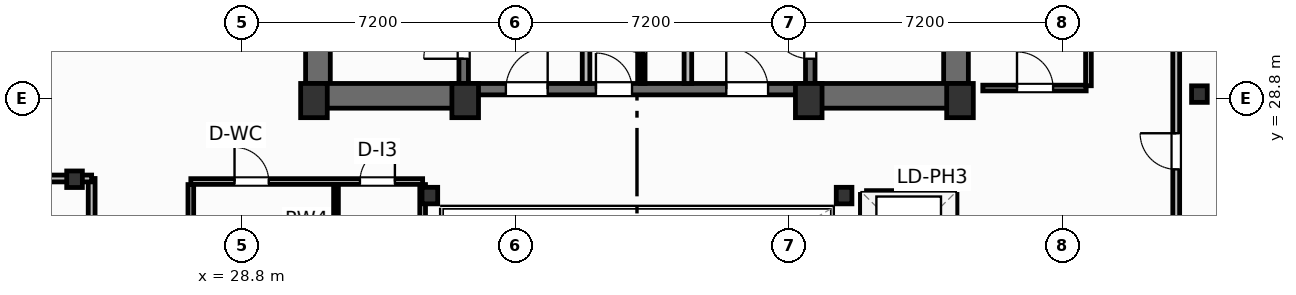
"""IFC4 building model, lengths in metres.
Left out: names, types, materials, properties, quantities, classifications, styles, units other than length and angle.
Written with IfcOpenShell. Run it as: python <this file> out.ifc"""

import sys

from ifc_helpers import new_model, si_unit, direction, frame, frame_2d, origin, origin_2d, place, context, subcontext, project, spatial, rectangle, i_section, extrude, element, fill, save


model = new_model("IFC4")
c1 = context("Model", 3, precision=1e-05, world=origin(), true_north=direction((0.0, 1.0)))
c2 = subcontext(c1, "Body", "Model", "MODEL_VIEW")
j1 = project(units=[si_unit("LENGTHUNIT", "METRE"), si_unit("PLANEANGLEUNIT", "RADIAN")], contexts=[c1])
p1 = place(None, origin())
s1 = spatial("IfcSite", under=j1, at=p1, CompositionType="ELEMENT")
p2 = place(p1, origin())
s2 = spatial("IfcBuilding", under=s1, at=p2, CompositionType="ELEMENT")
p3 = place(p2, frame((0.0, 0.0, 216.4)))
s3 = spatial("IfcBuildingStorey", under=s2, at=p3, CompositionType="ELEMENT", Elevation=216.4)
for number, where, z_axis, x_axis in (
    (1, (30.7, 28.75, 0.0), (0.0, 0.0, 1.0), (1.0, 0.0, 0.0)),
    (2, (34.68, 28.75, 0.0), (0.0, 0.0, 1.0), (1.0, 0.0, 0.0)),
    (3, (43.72, 28.75, 0.0), (0.0, 0.0, 1.0), (1.0, 0.0, 0.0)),
    (4, (47.7, 28.75, 0.0), (0.0, 0.0, 1.0), (1.0, 0.0, 0.0)),
):
    element("IfcColumn", number, at=place(p3, frame(where, z_axis=z_axis, x_axis=x_axis)), inside=s3, PredefinedType="COLUMN", context=c2, shape_type="SweptSolid", body=[
        extrude(rectangle(XDim=0.7, YDim=0.9, at=origin_2d()), origin(), (0.0, 0.0, 1.0), 3.7),
    ])
for number, where, z_axis, x_axis in (
    (5, (33.75, 26.25, 0.0), (0.0, 0.0, 1.0), (1.0, 0.0, 0.0)),
    (6, (44.65, 26.25, 0.0), (0.0, 0.0, 1.0), (1.0, 0.0, 0.0)),
    (7, (24.4, 26.68, 0.0), (0.0, 0.0, 1.0), (1.0, 0.0, 0.0)),
    (8, (54.0, 28.92, 0.0), (0.0, 0.0, 1.0), (1.0, 0.0, 0.0)),
):
    element("IfcColumn", number, at=place(p3, frame(where, z_axis=z_axis, x_axis=x_axis)), inside=s3, PredefinedType="COLUMN", context=c2, shape_type="SweptSolid", body=[
        extrude(i_section(OverallWidth=0.412, OverallDepth=0.435, WebThickness=0.036, FlangeThickness=0.057, FilletRadius=0.025, at=origin_2d()), origin(), (0.0, 0.0, 1.0), 3.7),
    ])
for number, where, z_axis, x_axis in (
    (9, (30.805, 29.2, 0.0), (0.0, 0.0, 1.0), (0.0, 1.0, 0.0)),
    (10, (47.595, 29.2, 0.0), (0.0, 0.0, 1.0), (0.0, 1.0, 0.0)),
):
    element("IfcWall", number, at=place(p3, frame(where, z_axis=z_axis, x_axis=x_axis)), inside=s3, PredefinedType="SHEAR", context=c2, shape_type="SweptSolid", body=[
        extrude(rectangle(XDim=9.22, YDim=0.65, at=frame_2d((4.61, 0.0))), origin(), (0.0, 0.0, 1.0), 3.45),
    ])
p4 = place(p3, frame((30.48, 28.875, 0.0), z_axis=(0.0, 0.0, 1.0), x_axis=(1.0, 0.0, 0.0)))
e11 = element("IfcWall", 11, at=p4, inside=s3, PredefinedType="SHEAR", context=c2, shape_type="SweptSolid", body=[
    extrude(rectangle(XDim=4.32, YDim=0.65, at=frame_2d((2.16, 0.0))), origin(), (0.0, 0.0, 1.0), 3.45),
])
p5 = place(p3, frame((43.6, 28.875, 0.0), z_axis=(0.0, 0.0, 1.0), x_axis=(1.0, 0.0, 0.0)))
e12 = element("IfcWall", 12, at=p5, inside=s3, PredefinedType="SHEAR", context=c2, shape_type="SweptSolid", body=[
    extrude(rectangle(XDim=4.32, YDim=0.65, at=frame_2d((2.16, 0.0))), origin(), (0.0, 0.0, 1.0), 3.45),
])
p6 = place(p3, frame((34.8, 29.05, 0.0), z_axis=(0.0, 0.0, 1.0), x_axis=(1.0, 0.0, 0.0)))
e13 = element("IfcWall", 13, at=p6, inside=s3, PredefinedType="SHEAR", context=c2, shape_type="SweptSolid", body=[
    extrude(rectangle(XDim=8.8, YDim=0.3, at=frame_2d((4.4, 0.0))), origin(), (0.0, 0.0, 1.0), 3.45),
])
p7 = place(p6, frame((0.95, 0.0, 0.0)))
e14 = element("IfcOpeningElement", 14, at=p7, cuts=e13, PredefinedType="OPENING", context=c2, shape_type="SweptSolid", body=[
    extrude(rectangle(XDim=1.1, YDim=2.15, at=frame_2d((0.55, 1.075))), frame((0.0, 0.16, 0.0), z_axis=(0.0, -1.0, 0.0), x_axis=(1.0, 0.0, 0.0)), (0.0, 0.0, 1.0), 0.32),
])
p8 = place(p6, frame((6.75, 0.0, 0.0)))
e15 = element("IfcOpeningElement", 15, at=p8, cuts=e13, PredefinedType="OPENING", context=c2, shape_type="SweptSolid", body=[
    extrude(rectangle(XDim=1.1, YDim=2.15, at=frame_2d((0.55, 1.075))), frame((0.0, 0.16, 0.0), z_axis=(0.0, -1.0, 0.0), x_axis=(1.0, 0.0, 0.0)), (0.0, 0.0, 1.0), 0.32),
])
p9 = place(p6, frame((3.32, 0.0, 0.0)))
e16 = element("IfcOpeningElement", 16, at=p9, cuts=e13, PredefinedType="OPENING", context=c2, shape_type="SweptSolid", body=[
    extrude(rectangle(XDim=0.95, YDim=2.15, at=frame_2d((0.475, 1.075))), frame((0.0, 0.16, 0.0), z_axis=(0.0, -1.0, 0.0), x_axis=(1.0, 0.0, 0.0)), (0.0, 0.0, 1.0), 0.32),
])
p10 = place(p3, frame((34.64, 29.2, 0.0), z_axis=(0.0, 0.0, 1.0), x_axis=(0.0, 1.0, 0.0)))
e17 = element("IfcWall", 17, at=p10, inside=s3, PredefinedType="SHEAR", context=c2, shape_type="SweptSolid", body=[
    extrude(rectangle(XDim=9.22, YDim=0.25, at=frame_2d((4.61, 0.0))), origin(), (0.0, 0.0, 1.0), 3.45),
])
p11 = place(p10, frame((0.65, 0.0, 0.0)))
e18 = element("IfcOpeningElement", 18, at=p11, cuts=e17, PredefinedType="OPENING", context=c2, shape_type="SweptSolid", body=[
    extrude(rectangle(XDim=1.05, YDim=2.15, at=frame_2d((0.525, 1.075))), frame((0.0, 0.135, 0.0), z_axis=(0.0, -1.0, 0.0), x_axis=(1.0, 0.0, 0.0)), (0.0, 0.0, 1.0), 0.27),
])
p12 = place(p3, frame((43.76, 29.2, 0.0), z_axis=(0.0, 0.0, 1.0), x_axis=(0.0, 1.0, 0.0)))
e19 = element("IfcWall", 19, at=p12, inside=s3, PredefinedType="SHEAR", context=c2, shape_type="SweptSolid", body=[
    extrude(rectangle(XDim=9.22, YDim=0.25, at=frame_2d((4.61, 0.0))), origin(), (0.0, 0.0, 1.0), 3.45),
])
p13 = place(p12, frame((0.65, 0.0, 0.0)))
e20 = element("IfcOpeningElement", 20, at=p13, cuts=e19, PredefinedType="OPENING", context=c2, shape_type="SweptSolid", body=[
    extrude(rectangle(XDim=1.05, YDim=2.15, at=frame_2d((0.525, 1.075))), frame((0.0, 0.135, 0.0), z_axis=(0.0, -1.0, 0.0), x_axis=(1.0, 0.0, 0.0)), (0.0, 0.0, 1.0), 0.27),
])
p14 = place(p3, frame((24.85, 19.2, 0.0), z_axis=(0.0, 0.0, 1.0), x_axis=(0.0, 1.0, 0.0)))
e21 = element("IfcWall", 21, at=p14, inside=s3, PredefinedType="PARTITIONING", context=c2, shape_type="SweptSolid", body=[
    extrude(rectangle(XDim=7.5, YDim=0.18, at=frame_2d((3.75, 0.0))), origin(), (0.0, 0.0, 1.0), 3.45),
])
p15 = place(p14, frame((3.275, 0.0, 0.0)))
e22 = element("IfcOpeningElement", 22, at=p15, cuts=e21, PredefinedType="OPENING", context=c2, shape_type="SweptSolid", body=[
    extrude(rectangle(XDim=0.95, YDim=2.05, at=frame_2d((0.475, 1.025))), frame((0.0, 0.1, 0.0), z_axis=(0.0, -1.0, 0.0), x_axis=(1.0, 0.0, 0.0)), (0.0, 0.0, 1.0), 0.2),
])
p16 = place(p3, frame((3.467, 26.7, 0.0), z_axis=(0.0, 0.0, 1.0), x_axis=(1.0, 0.0, 0.0)))
e23 = element("IfcWall", 23, at=p16, inside=s3, PredefinedType="PARTITIONING", context=c2, shape_type="SweptSolid", body=[
    extrude(rectangle(XDim=21.383, YDim=0.18, at=frame_2d((10.691, 0.0))), origin(), (0.0, 0.0, 1.0), 2.662),
])
p17 = place(p3, frame((53.39, 19.24, 0.0), z_axis=(0.0, 0.0, 1.0), x_axis=(0.0, 1.0, 0.0)))
e24 = element("IfcWall", 24, at=p17, inside=s3, PredefinedType="PARTITIONING", context=c2, shape_type="SweptSolid", body=[
    extrude(rectangle(XDim=20.06, YDim=0.18, at=frame_2d((10.03, 0.0))), origin(), (0.0, 0.0, 1.0), 3.45),
])
p18 = place(p17, frame((7.7, 0.0, 0.0)))
e25 = element("IfcOpeningElement", 25, at=p18, cuts=e24, PredefinedType="OPENING", context=c2, shape_type="SweptSolid", body=[
    extrude(rectangle(XDim=0.95, YDim=2.05, at=frame_2d((0.475, 1.025))), frame((0.0, 0.1, 0.0), z_axis=(0.0, -1.0, 0.0), x_axis=(1.0, 0.0, 0.0)), (0.0, 0.0, 1.0), 0.2),
])
for number, where, z_axis, x_axis in (
    (26, (37.86, 29.2, 0.0), (0.0, 0.0, 1.0), (0.0, 1.0, 0.0)),
    (27, (40.54, 29.2, 0.0), (0.0, 0.0, 1.0), (0.0, 1.0, 0.0)),
):
    element("IfcWall", number, at=place(p3, frame(where, z_axis=z_axis, x_axis=x_axis)), inside=s3, PredefinedType="PARTITIONING", context=c2, shape_type="SweptSolid", body=[
        extrude(rectangle(XDim=5.18, YDim=0.2, at=frame_2d((2.59, 0.0))), origin(), (0.0, 0.0, 1.0), 3.45),
    ])
p19 = place(p3, frame((39.35, 29.2, 0.0), z_axis=(0.0, 0.0, 1.0), x_axis=(0.0, 1.0, 0.0)))
e28 = element("IfcWall", 28, at=p19, inside=s3, PredefinedType="PARTITIONING", context=c2, shape_type="SweptSolid", body=[
    extrude(rectangle(XDim=5.22, YDim=0.125, at=frame_2d((2.61, 0.0))), origin(), (0.0, 0.0, 1.0), 3.45),
])
p20 = place(p19, frame((0.8, 0.0, 0.0)))
e29 = element("IfcOpeningElement", 29, at=p20, cuts=e28, PredefinedType="OPENING", context=c2, shape_type="SweptSolid", body=[
    extrude(rectangle(XDim=0.85, YDim=2.05, at=frame_2d((0.425, 1.025))), frame((0.0, 0.073, 0.0), z_axis=(0.0, -1.0, 0.0), x_axis=(1.0, 0.0, 0.0)), (0.0, 0.0, 1.0), 0.145),
])
p21 = place(p19, frame((3.4, 0.0, 0.0)))
e30 = element("IfcOpeningElement", 30, at=p21, cuts=e28, PredefinedType="OPENING", context=c2, shape_type="SweptSolid", body=[
    extrude(rectangle(XDim=0.85, YDim=2.05, at=frame_2d((0.425, 1.025))), frame((0.0, 0.073, 0.0), z_axis=(0.0, -1.0, 0.0), x_axis=(1.0, 0.0, 0.0)), (0.0, 0.0, 1.0), 0.145),
])
p22 = place(p3, frame((27.46, 26.62, 0.0), z_axis=(0.0, 0.0, 1.0), x_axis=(1.0, 0.0, 0.0)))
e31 = element("IfcWall", 31, at=p22, inside=s3, PredefinedType="PARTITIONING", context=c2, shape_type="SweptSolid", body=[
    extrude(rectangle(XDim=6.1, YDim=0.15, at=frame_2d((3.05, 0.0))), origin(), (0.0, 0.0, 1.0), 2.662),
])
p23 = place(p22, frame((1.15, 0.0, 0.0)))
e32 = element("IfcOpeningElement", 32, at=p23, cuts=e31, PredefinedType="OPENING", context=c2, shape_type="SweptSolid", body=[
    extrude(rectangle(XDim=0.9, YDim=2.05, at=frame_2d((0.45, 1.025))), frame((0.0, 0.085, 0.0), z_axis=(0.0, -1.0, 0.0), x_axis=(1.0, 0.0, 0.0)), (0.0, 0.0, 1.0), 0.17),
])
p24 = place(p22, frame((4.45, 0.0, 0.0)))
e33 = element("IfcOpeningElement", 33, at=p24, cuts=e31, PredefinedType="OPENING", context=c2, shape_type="SweptSolid", body=[
    extrude(rectangle(XDim=0.92, YDim=2.05, at=frame_2d((0.46, 1.025))), frame((0.0, 0.085, 0.0), z_axis=(0.0, -1.0, 0.0), x_axis=(1.0, 0.0, 0.0)), (0.0, 0.0, 1.0), 0.17),
])
p25 = place(p3, frame((31.28, 19.38, 0.0), z_axis=(0.0, 0.0, 1.0), x_axis=(0.0, 1.0, 0.0)))
e34 = element("IfcWall", 34, at=p25, inside=s3, PredefinedType="PARTITIONING", context=c2, shape_type="SweptSolid", body=[
    extrude(rectangle(XDim=7.16, YDim=0.125, at=frame_2d((3.58, 0.0))), origin(), (0.0, 0.0, 1.0), 3.45),
])
p26 = place(p3, frame((27.46, 19.38, 0.0), z_axis=(0.0, 0.0, 1.0), x_axis=(0.0, 1.0, 0.0)))
e35 = element("IfcWall", 35, at=p26, inside=s3, PredefinedType="PARTITIONING", context=c2, shape_type="SweptSolid", body=[
    extrude(rectangle(XDim=7.16, YDim=0.15, at=frame_2d((3.58, 0.0))), origin(), (0.0, 0.0, 1.0), 3.45),
])
p27 = place(p26, frame((1.4, 0.0, 0.0)))
e36 = element("IfcOpeningElement", 36, at=p27, cuts=e35, PredefinedType="OPENING", context=c2, shape_type="SweptSolid", body=[
    extrude(rectangle(XDim=0.95, YDim=2.05, at=frame_2d((0.475, 1.025))), frame((0.0, 0.085, 0.0), z_axis=(0.0, -1.0, 0.0), x_axis=(1.0, 0.0, 0.0)), (0.0, 0.0, 1.0), 0.17),
])
p28 = place(p3, frame((33.56, 19.38, 0.0), z_axis=(0.0, 0.0, 1.0), x_axis=(0.0, 1.0, 0.0)))
e37 = element("IfcWall", 37, at=p28, inside=s3, PredefinedType="PARTITIONING", context=c2, shape_type="SweptSolid", body=[
    extrude(rectangle(XDim=7.16, YDim=0.15, at=frame_2d((3.58, 0.0))), origin(), (0.0, 0.0, 1.0), 2.824),
])
p29 = place(p3, frame((48.3, 29.08, 0.0), z_axis=(0.0, 0.0, 1.0), x_axis=(1.0, 0.0, 0.0)))
e38 = element("IfcWall", 38, at=p29, inside=s3, PredefinedType="PARTITIONING", context=c2, shape_type="SweptSolid", body=[
    extrude(rectangle(XDim=2.72, YDim=0.15, at=frame_2d((1.36, 0.0))), origin(), (0.0, 0.0, 1.0), 2.662),
])
p30 = place(p29, frame((0.9, 0.0, 0.0)))
e39 = element("IfcOpeningElement", 39, at=p30, cuts=e38, PredefinedType="OPENING", context=c2, shape_type="SweptSolid", body=[
    extrude(rectangle(XDim=0.95, YDim=2.05, at=frame_2d((0.475, 1.025))), frame((0.0, 0.085, 0.0), z_axis=(0.0, -1.0, 0.0), x_axis=(1.0, 0.0, 0.0)), (0.0, 0.0, 1.0), 0.17),
])
p31 = place(p3, frame((51.08, 29.14, 0.0), z_axis=(0.0, 0.0, 1.0), x_axis=(0.0, 1.0, 0.0)))
e40 = element("IfcWall", 40, at=p31, inside=s3, PredefinedType="PARTITIONING", context=c2, shape_type="SweptSolid", body=[
    extrude(rectangle(XDim=4.69, YDim=0.15, at=frame_2d((2.345, 0.0))), origin(), (0.0, 0.0, 1.0), 3.45),
])
p32 = place(p3, frame((45.24, 26.28, 0.0), z_axis=(0.0, 0.0, 1.0), x_axis=(1.0, 0.0, 0.0)))
e41 = element("IfcWall", 41, at=p32, inside=s3, PredefinedType="PARTITIONING", context=c2, shape_type="SweptSolid", body=[
    extrude(rectangle(XDim=2.22, YDim=0.2, at=frame_2d((1.11, 0.0))), origin(), (0.0, 0.0, 1.0), 3.45),
])
p33 = place(p3, frame((45.18, 19.38, 0.0), z_axis=(0.0, 0.0, 1.0), x_axis=(0.0, 1.0, 0.0)))
e42 = element("IfcWall", 42, at=p33, inside=s3, PredefinedType="PARTITIONING", context=c2, shape_type="SweptSolid", body=[
    extrude(rectangle(XDim=6.9, YDim=0.2, at=frame_2d((3.45, 0.0))), origin(), (0.0, 0.0, 1.0), 3.45),
])
p34 = place(p3, frame((47.52, 19.38, 0.0), z_axis=(0.0, 0.0, 1.0), x_axis=(0.0, 1.0, 0.0)))
e43 = element("IfcWall", 43, at=p34, inside=s3, PredefinedType="PARTITIONING", context=c2, shape_type="SweptSolid", body=[
    extrude(rectangle(XDim=6.9, YDim=0.2, at=frame_2d((3.45, 0.0))), origin(), (0.0, 0.0, 1.0), 3.45),
])
p35 = place(p34, frame((0.59, 0.0, 0.0)))
e44 = element("IfcOpeningElement", 44, at=p35, cuts=e43, PredefinedType="OPENING", context=c2, shape_type="SweptSolid", body=[
    extrude(rectangle(XDim=1.1, YDim=2.15, at=frame_2d((0.55, 1.075))), frame((0.0, 0.11, 0.0), z_axis=(0.0, -1.0, 0.0), x_axis=(1.0, 0.0, 0.0)), (0.0, 0.0, 1.0), 0.22),
])
p36 = place(p34, frame((2.89, 0.0, 0.0)))
e45 = element("IfcOpeningElement", 45, at=p36, cuts=e43, PredefinedType="OPENING", context=c2, shape_type="SweptSolid", body=[
    extrude(rectangle(XDim=1.1, YDim=2.15, at=frame_2d((0.55, 1.075))), frame((0.0, 0.11, 0.0), z_axis=(0.0, -1.0, 0.0), x_axis=(1.0, 0.0, 0.0)), (0.0, 0.0, 1.0), 0.22),
])
p37 = place(p34, frame((5.19, 0.0, 0.0)))
e46 = element("IfcOpeningElement", 46, at=p37, cuts=e43, PredefinedType="OPENING", context=c2, shape_type="SweptSolid", body=[
    extrude(rectangle(XDim=1.1, YDim=2.15, at=frame_2d((0.55, 1.075))), frame((0.0, 0.11, 0.0), z_axis=(0.0, -1.0, 0.0), x_axis=(1.0, 0.0, 0.0)), (0.0, 0.0, 1.0), 0.22),
])
p38 = place(p18, origin())
e47 = element("IfcDoor", 47, at=p38, inside=s3, OperationType="SINGLE_SWING_RIGHT", PredefinedType="DOOR", context=c2, shape_type="SweptSolid", body=[
    extrude(rectangle(XDim=0.95, YDim=2.05, at=frame_2d((0.475, 1.025))), frame((0.0, 0.025, 0.0), z_axis=(0.0, -1.0, 0.0), x_axis=(1.0, 0.0, 0.0)), (0.0, 0.0, 1.0), 0.05),
])
fill(e25, e47)
p39 = place(p11, origin())
e48 = element("IfcDoor", 48, at=p39, inside=s3, OperationType="SINGLE_SWING_LEFT", PredefinedType="DOOR", context=c2, shape_type="SweptSolid", body=[
    extrude(rectangle(XDim=1.05, YDim=2.15, at=frame_2d((0.525, 1.075))), frame((0.0, 0.025, 0.0), z_axis=(0.0, -1.0, 0.0), x_axis=(1.0, 0.0, 0.0)), (0.0, 0.0, 1.0), 0.05),
])
fill(e18, e48)
p40 = place(p13, origin())
e49 = element("IfcDoor", 49, at=p40, inside=s3, OperationType="SINGLE_SWING_RIGHT", PredefinedType="DOOR", context=c2, shape_type="SweptSolid", body=[
    extrude(rectangle(XDim=1.05, YDim=2.15, at=frame_2d((0.525, 1.075))), frame((0.0, 0.025, 0.0), z_axis=(0.0, -1.0, 0.0), x_axis=(1.0, 0.0, 0.0)), (0.0, 0.0, 1.0), 0.05),
])
fill(e20, e49)
p41 = place(p7, origin())
e50 = element("IfcDoor", 50, at=p41, inside=s3, OperationType="SINGLE_SWING_RIGHT", PredefinedType="DOOR", context=c2, shape_type="SweptSolid", body=[
    extrude(rectangle(XDim=1.1, YDim=2.15, at=frame_2d((0.55, 1.075))), frame((0.0, 0.025, 0.0), z_axis=(0.0, -1.0, 0.0), x_axis=(1.0, 0.0, 0.0)), (0.0, 0.0, 1.0), 0.05),
])
fill(e14, e50)
p42 = place(p8, origin())
e51 = element("IfcDoor", 51, at=p42, inside=s3, OperationType="SINGLE_SWING_LEFT", PredefinedType="DOOR", context=c2, shape_type="SweptSolid", body=[
    extrude(rectangle(XDim=1.1, YDim=2.15, at=frame_2d((0.55, 1.075))), frame((0.0, 0.025, 0.0), z_axis=(0.0, -1.0, 0.0), x_axis=(1.0, 0.0, 0.0)), (0.0, 0.0, 1.0), 0.05),
])
fill(e15, e51)
p43 = place(p20, origin())
e52 = element("IfcDoor", 52, at=p43, inside=s3, OperationType="SINGLE_SWING_RIGHT", PredefinedType="DOOR", context=c2, shape_type="SweptSolid", body=[
    extrude(rectangle(XDim=0.85, YDim=2.05, at=frame_2d((0.425, 1.025))), frame((0.0, 0.025, 0.0), z_axis=(0.0, -1.0, 0.0), x_axis=(1.0, 0.0, 0.0)), (0.0, 0.0, 1.0), 0.05),
])
fill(e29, e52)
p44 = place(p9, origin())
e53 = element("IfcDoor", 53, at=p44, inside=s3, OperationType="SINGLE_SWING_LEFT", PredefinedType="DOOR", context=c2, shape_type="SweptSolid", body=[
    extrude(rectangle(XDim=0.95, YDim=2.15, at=frame_2d((0.475, 1.075))), frame((0.0, 0.025, 0.0), z_axis=(0.0, -1.0, 0.0), x_axis=(1.0, 0.0, 0.0)), (0.0, 0.0, 1.0), 0.05),
])
fill(e16, e53)
p45 = place(p23, origin())
e54 = element("IfcDoor", 54, at=p45, inside=s3, OperationType="SINGLE_SWING_LEFT", PredefinedType="DOOR", context=c2, shape_type="SweptSolid", body=[
    extrude(rectangle(XDim=0.9, YDim=2.05, at=frame_2d((0.45, 1.025))), frame((0.0, 0.025, 0.0), z_axis=(0.0, -1.0, 0.0), x_axis=(1.0, 0.0, 0.0)), (0.0, 0.0, 1.0), 0.05),
])
fill(e32, e54)
p46 = place(p24, origin())
e55 = element("IfcDoor", 55, at=p46, inside=s3, OperationType="SINGLE_SWING_RIGHT", PredefinedType="DOOR", context=c2, shape_type="SweptSolid", body=[
    extrude(rectangle(XDim=0.92, YDim=2.05, at=frame_2d((0.46, 1.025))), frame((0.0, 0.025, 0.0), z_axis=(0.0, -1.0, 0.0), x_axis=(1.0, 0.0, 0.0)), (0.0, 0.0, 1.0), 0.05),
])
fill(e33, e55)
p47 = place(p30, origin())
e56 = element("IfcDoor", 56, at=p47, inside=s3, OperationType="SINGLE_SWING_LEFT", PredefinedType="DOOR", context=c2, shape_type="SweptSolid", body=[
    extrude(rectangle(XDim=0.95, YDim=2.05, at=frame_2d((0.475, 1.025))), frame((0.0, 0.025, 0.0), z_axis=(0.0, -1.0, 0.0), x_axis=(1.0, 0.0, 0.0)), (0.0, 0.0, 1.0), 0.05),
])
fill(e39, e56)
save(model, sys.argv[1])
